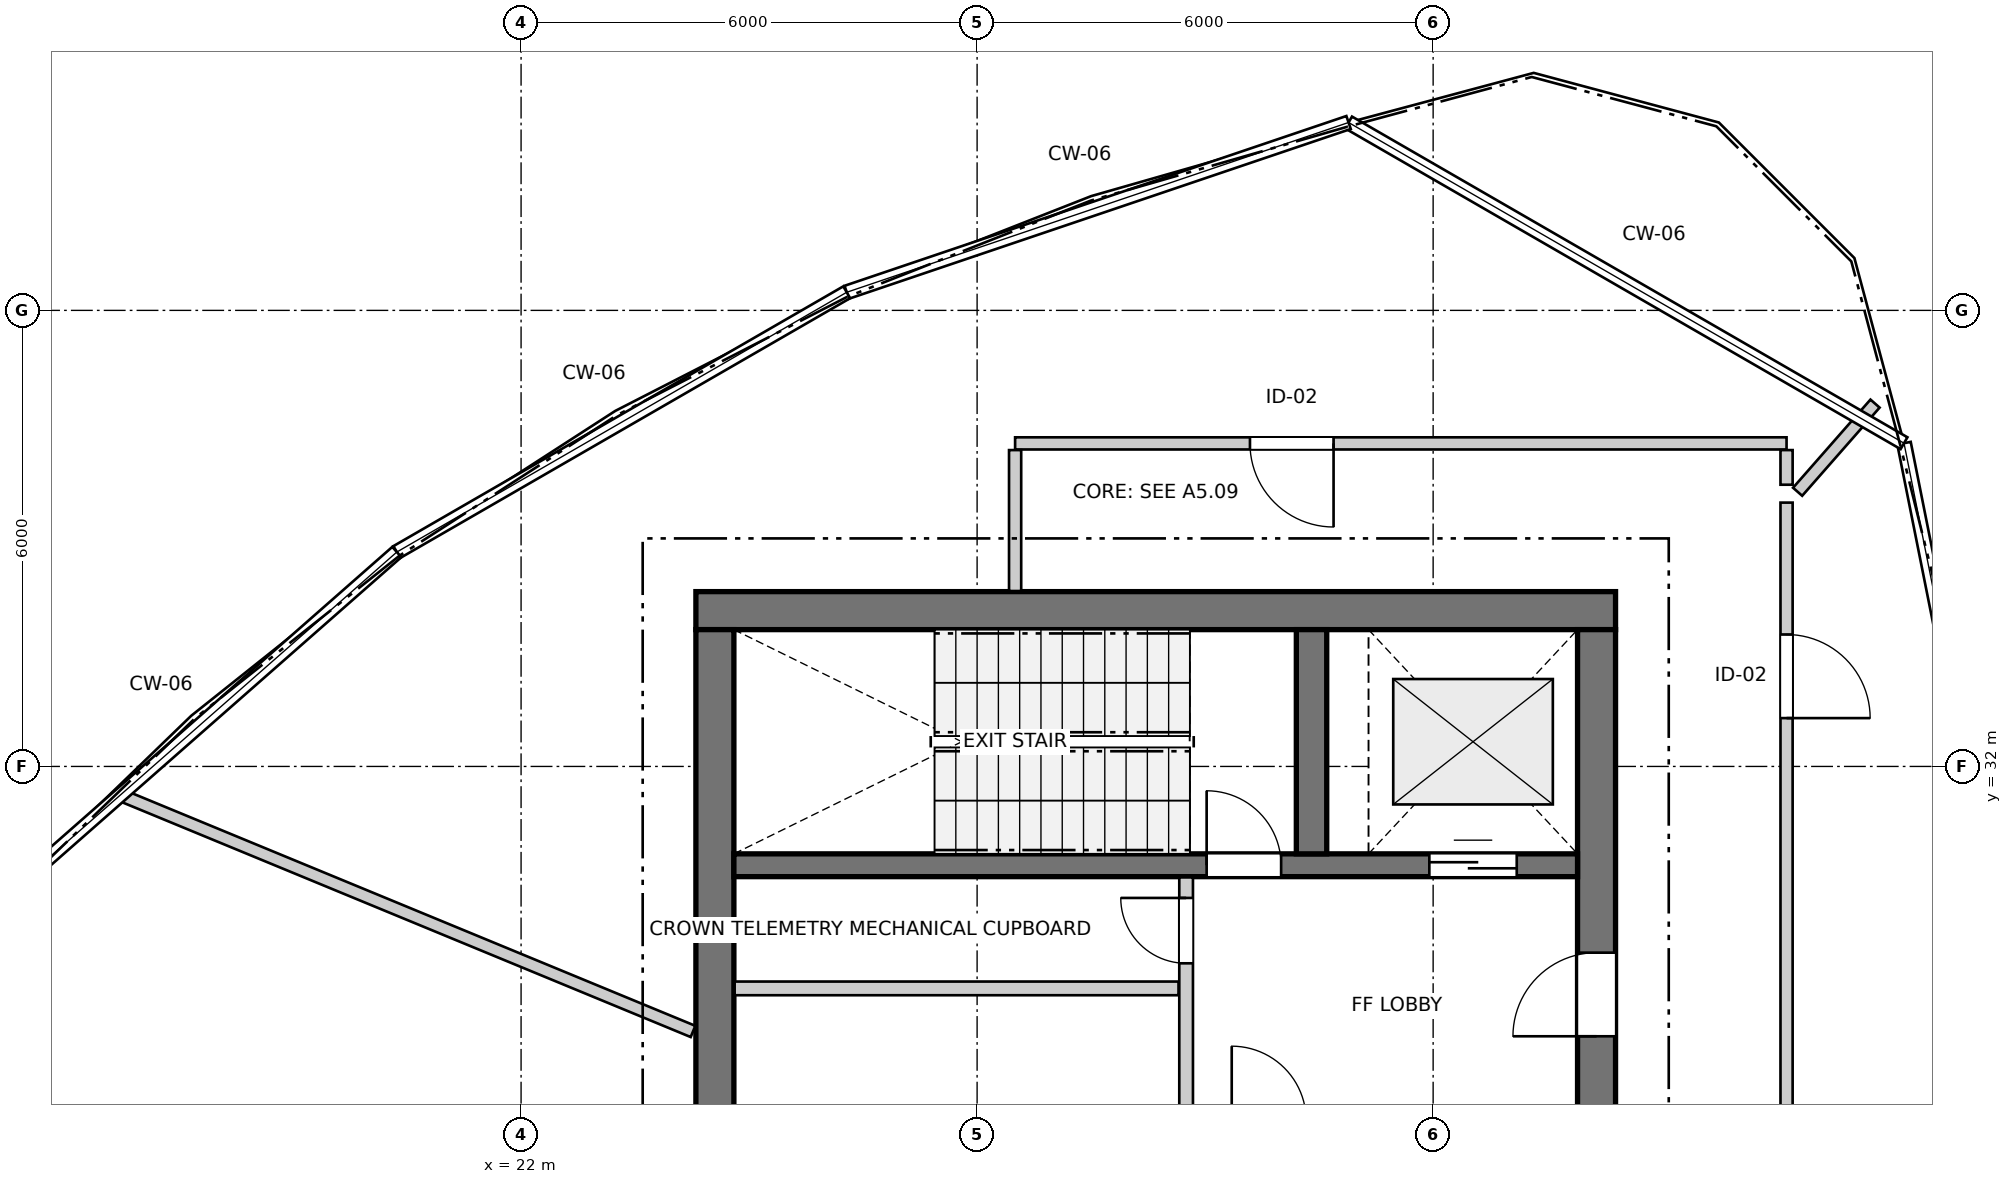
"""IFC4 building model, lengths in metres.
Left out: names, types, materials, properties, quantities, classifications, styles, units other than length and angle.
Written with IfcOpenShell. Run it as: python <this file> out.ifc"""

import sys

from ifc_helpers import new_model, si_unit, direction, frame, frame_2d, origin, place, context, subcontext, project, spatial, rectangle, extrude, source, transform, mapped, element, fill, save


model = new_model("IFC4")
c1 = context("Model", 3, precision=1e-05, world=origin(), true_north=direction((0.0, 1.0)))
c2 = subcontext(c1, "Body", "Model", "MODEL_VIEW")
j1 = project(units=[si_unit("LENGTHUNIT", "METRE"), si_unit("PLANEANGLEUNIT", "RADIAN")], contexts=[c1])
p1 = place(None, origin())
s1 = spatial("IfcSite", under=j1, at=p1, CompositionType="ELEMENT")
p2 = place(p1, origin())
s2 = spatial("IfcBuilding", under=s1, at=p2, CompositionType="ELEMENT")
p3 = place(p2, frame((0.0, 0.0, 261.8)))
s3 = spatial("IfcBuildingStorey", under=s2, at=p3, CompositionType="ELEMENT", Elevation=261.8)
p4 = place(p3, frame((36.4, 34.05, 0.0), z_axis=(0.0, 0.0, 1.0), x_axis=(-1.0, 0.0, 0.0)))
e1 = element("IfcWall", 1, at=p4, inside=s3, PredefinedType="SHEAR", context=c2, shape_type="SweptSolid", body=[
    extrude(rectangle(XDim=12.1, YDim=0.5, at=frame_2d((6.05, 0.0))), origin(), (0.0, 0.0, 1.0), 4.05),
])
p5 = place(p3, frame((24.55, 33.8, 0.0), z_axis=(0.0, 0.0, 1.0), x_axis=(0.0, -1.0, 0.0)))
e2 = element("IfcWall", 2, at=p5, inside=s3, PredefinedType="SHEAR", context=c2, shape_type="SweptSolid", body=[
    extrude(rectangle(XDim=15.6, YDim=0.5, at=frame_2d((7.8, 0.0))), origin(), (0.0, 0.0, 1.0), 4.05),
])
p6 = place(p3, frame((36.15, 18.2, 0.0), z_axis=(0.0, 0.0, 1.0), x_axis=(0.0, 1.0, 0.0)))
e3 = element("IfcWall", 3, at=p6, inside=s3, PredefinedType="SHEAR", context=c2, shape_type="SweptSolid", body=[
    extrude(rectangle(XDim=15.6, YDim=0.5, at=frame_2d((7.8, 0.0))), origin(), (0.0, 0.0, 1.0), 4.05),
])
p7 = place(p6, frame((4.25, 0.0, 0.0)))
e4 = element("IfcOpeningElement", 4, at=p7, cuts=e3, PredefinedType="OPENING", context=c2, shape_type="SweptSolid", body=[
    extrude(rectangle(XDim=1.1, YDim=2.15, at=frame_2d((0.55, 1.075))), frame((0.0, 0.26, 0.0), z_axis=(0.0, -1.0, 0.0), x_axis=(1.0, 0.0, 0.0)), (0.0, 0.0, 1.0), 0.52),
])
p8 = place(p6, frame((10.25, 0.0, 0.0)))
e5 = element("IfcOpeningElement", 5, at=p8, cuts=e3, PredefinedType="OPENING", context=c2, shape_type="SweptSolid", body=[
    extrude(rectangle(XDim=1.1, YDim=2.15, at=frame_2d((0.55, 1.075))), frame((0.0, 0.26, 0.0), z_axis=(0.0, -1.0, 0.0), x_axis=(1.0, 0.0, 0.0)), (0.0, 0.0, 1.0), 0.52),
])
p9 = place(p3, frame((24.8, 30.7, 0.0), z_axis=(0.0, 0.0, 1.0), x_axis=(1.0, 0.0, 0.0)))
e6 = element("IfcWall", 6, at=p9, inside=s3, PredefinedType="SHEAR", context=c2, shape_type="SweptSolid", body=[
    extrude(rectangle(XDim=11.1, YDim=0.3, at=frame_2d((5.55, 0.0))), origin(), (0.0, 0.0, 1.0), 4.05),
])
p10 = place(p9, frame((6.22, 0.0, 0.0)))
e7 = element("IfcOpeningElement", 7, at=p10, cuts=e6, PredefinedType="OPENING", context=c2, shape_type="SweptSolid", body=[
    extrude(rectangle(XDim=0.98, YDim=2.15, at=frame_2d((0.49, 1.075))), frame((0.0, 0.16, 0.0), z_axis=(0.0, -1.0, 0.0), x_axis=(1.0, 0.0, 0.0)), (0.0, 0.0, 1.0), 0.32),
])
p11 = place(p9, frame((9.15, 0.0, 0.0)))
e8 = element("IfcOpeningElement", 8, at=p11, cuts=e6, PredefinedType="OPENING", context=c2, shape_type="SweptSolid", body=[
    extrude(rectangle(XDim=1.15, YDim=2.15, at=frame_2d((0.575, 1.075))), frame((0.0, 0.16, 0.0), z_axis=(0.0, -1.0, 0.0), x_axis=(1.0, 0.0, 0.0)), (0.0, 0.0, 1.0), 0.32),
])
p12 = place(p3, frame((32.4, 30.85, 0.0), z_axis=(0.0, 0.0, 1.0), x_axis=(0.0, 1.0, 0.0)))
e9 = element("IfcWall", 9, at=p12, inside=s3, PredefinedType="SHEAR", context=c2, shape_type="SweptSolid", body=[
    extrude(rectangle(XDim=2.95, YDim=0.4, at=frame_2d((1.475, 0.0))), origin(), (0.0, 0.0, 1.0), 4.05),
])
p13 = place(p3, frame((30.75, 27.43, 0.0), z_axis=(0.0, 0.0, 1.0), x_axis=(0.0, 1.0, 0.0)))
e10 = element("IfcWall", 10, at=p13, inside=s3, PredefinedType="PARTITIONING", context=c2, shape_type="SweptSolid", body=[
    extrude(rectangle(XDim=3.11, YDim=0.18, at=frame_2d((1.555, 0.0))), origin(), (0.0, 0.0, 1.0), 4.05),
])
p14 = place(p13, frame((1.98, 0.0, 0.0)))
e11 = element("IfcOpeningElement", 11, at=p14, cuts=e10, PredefinedType="OPENING", context=c2, shape_type="SweptSolid", body=[
    extrude(rectangle(XDim=0.86, YDim=2.05, at=frame_2d((0.43, 1.025))), frame((0.0, 0.1, 0.0), z_axis=(0.0, -1.0, 0.0), x_axis=(1.0, 0.0, 0.0)), (0.0, 0.0, 1.0), 0.2),
])
p15 = place(p3, frame((24.81, 29.08, 0.0), z_axis=(0.0, 0.0, 1.0), x_axis=(1.0, 0.0, 0.0)))
e12 = element("IfcWall", 12, at=p15, inside=s3, PredefinedType="PARTITIONING", context=c2, shape_type="SweptSolid", body=[
    extrude(rectangle(XDim=5.84, YDim=0.18, at=frame_2d((2.92, 0.0))), origin(), (0.0, 0.0, 1.0), 4.05),
])
p16 = place(p3, frame((38.65, 35.471, 0.0), z_axis=(0.0, 0.0, 1.0), x_axis=(0.0, -1.0, 0.0)))
e13 = element("IfcWall", 13, at=p16, inside=s3, PredefinedType="PARTITIONING", context=c2, shape_type="SweptSolid", body=[
    extrude(rectangle(XDim=19.721, YDim=0.16, at=frame_2d((9.86, 0.0))), origin(), (0.0, 0.0, 1.0), 4.05),
])
p17 = place(p16, frame((1.735, 0.0, 0.0)))
e14 = element("IfcOpeningElement", 14, at=p17, cuts=e13, PredefinedType="OPENING", context=c2, shape_type="SweptSolid", body=[
    extrude(rectangle(XDim=1.1, YDim=2.15, at=frame_2d((0.55, 1.075))), frame((0.0, 0.09, 0.0), z_axis=(0.0, -1.0, 0.0), x_axis=(1.0, 0.0, 0.0)), (0.0, 0.0, 1.0), 0.18),
])
p18 = place(p3, frame((38.65, 36.25, 0.0), z_axis=(0.0, 0.0, 1.0), x_axis=(-1.0, 0.0, 0.0)))
e15 = element("IfcWall", 15, at=p18, inside=s3, PredefinedType="PARTITIONING", context=c2, shape_type="SweptSolid", body=[
    extrude(rectangle(XDim=10.15, YDim=0.16, at=frame_2d((5.075, 0.0))), origin(), (0.0, 0.0, 1.0), 4.05),
])
p19 = place(p18, frame((5.96, 0.0, 0.0)))
e16 = element("IfcOpeningElement", 16, at=p19, cuts=e15, PredefinedType="OPENING", context=c2, shape_type="SweptSolid", body=[
    extrude(rectangle(XDim=1.1, YDim=2.15, at=frame_2d((0.55, 1.075))), frame((0.0, 0.09, 0.0), z_axis=(0.0, -1.0, 0.0), x_axis=(1.0, 0.0, 0.0)), (0.0, 0.0, 1.0), 0.18),
])
p20 = place(p3, frame((16.755, 31.614, 0.0), z_axis=(0.0, 0.0, 1.0), x_axis=(0.924294163269, -0.381680887323, 0.0)))
e17 = element("IfcWall", 17, at=p20, inside=s3, PredefinedType="PARTITIONING", context=c2, shape_type="SweptSolid", body=[
    extrude(rectangle(XDim=8.122, YDim=0.16, at=frame_2d((4.061, 0.0))), origin(), (0.0, 0.0, 1.0), 4.05),
])
p21 = place(p3, frame((28.5, 34.308, 0.0), z_axis=(0.0, 0.0, 1.0), x_axis=(0.0, 1.0, 0.0)))
e18 = element("IfcWall", 18, at=p21, inside=s3, PredefinedType="PARTITIONING", context=c2, shape_type="SweptSolid", body=[
    extrude(rectangle(XDim=1.854, YDim=0.16, at=frame_2d((0.927, 0.0))), origin(), (0.0, 0.0, 1.0), 4.05),
])
p22 = place(p3, frame((38.795, 35.614, 0.0), z_axis=(0.0, 0.0, 1.0), x_axis=(0.65984690388, 0.751400068832, 0.0)))
e19 = element("IfcWall", 19, at=p22, inside=s3, PredefinedType="PARTITIONING", context=c2, shape_type="SweptSolid", body=[
    extrude(rectangle(XDim=1.544, YDim=0.16, at=frame_2d((0.772, 0.0))), origin(), (0.0, 0.0, 1.0), 4.05),
])
p23 = place(p3, frame((38.65, 35.706, 0.0), z_axis=(0.0, 0.0, 1.0), x_axis=(0.0, 1.0, 0.0)))
e20 = element("IfcWall", 20, at=p23, inside=s3, PredefinedType="PARTITIONING", context=c2, shape_type="SweptSolid", body=[
    extrude(rectangle(XDim=0.456, YDim=0.16, at=frame_2d((0.228, 0.0))), origin(), (0.0, 0.0, 1.0), 4.05),
])
m1 = source(origin(), c2, "Body", "SweptSolid", [
    extrude(rectangle(XDim=0.98, YDim=2.15, at=frame_2d((0.49, 1.075))), frame((0.0, 0.025, 0.0), z_axis=(0.0, -1.0, 0.0), x_axis=(1.0, 0.0, 0.0)), (0.0, 0.0, 1.0), 0.05),
])
p24 = place(p10, origin())
e21 = element("IfcDoor", 21, at=p24, inside=s3, OperationType="SINGLE_SWING_LEFT", PredefinedType="DOOR", context=c2, shape_type="MappedRepresentation", body=[
    mapped(m1, transform((0.0, 0.0, 0.0), x_axis=(1.0, 0.0, 0.0), y_axis=(0.0, 1.0, 0.0), z_axis=(0.0, 0.0, 1.0), scale=1.0)),
])
fill(e7, e21)
m2 = source(origin(), c2, "Body", "SweptSolid", [
    extrude(rectangle(XDim=1.15, YDim=2.15, at=frame_2d((0.575, 1.075))), frame((0.0, 0.025, 0.0), z_axis=(0.0, -1.0, 0.0), x_axis=(1.0, 0.0, 0.0)), (0.0, 0.0, 1.0), 0.05),
])
p25 = place(p11, origin())
e22 = element("IfcDoor", 22, at=p25, inside=s3, OperationType="DOUBLE_DOOR_SLIDING", PredefinedType="DOOR", context=c2, shape_type="MappedRepresentation", body=[
    mapped(m2, transform((0.0, 0.0, 0.0), x_axis=(1.0, 0.0, 0.0), y_axis=(0.0, 1.0, 0.0), z_axis=(0.0, 0.0, 1.0), scale=1.0)),
])
fill(e8, e22)
m3 = source(origin(), c2, "Body", "SweptSolid", [
    extrude(rectangle(XDim=1.1, YDim=2.15, at=frame_2d((0.55, 1.075))), frame((0.0, 0.025, 0.0), z_axis=(0.0, -1.0, 0.0), x_axis=(1.0, 0.0, 0.0)), (0.0, 0.0, 1.0), 0.05),
])
p26 = place(p8, origin())
e23 = element("IfcDoor", 23, at=p26, inside=s3, OperationType="SINGLE_SWING_LEFT", PredefinedType="DOOR", context=c2, shape_type="MappedRepresentation", body=[
    mapped(m3, transform((0.0, 0.0, 0.0), x_axis=(1.0, 0.0, 0.0), y_axis=(0.0, 1.0, 0.0), z_axis=(0.0, 0.0, 1.0), scale=1.0)),
])
fill(e5, e23)
m4 = source(origin(), c2, "Body", "SweptSolid", [
    extrude(rectangle(XDim=0.86, YDim=2.05, at=frame_2d((0.43, 1.025))), frame((0.0, 0.025, 0.0), z_axis=(0.0, -1.0, 0.0), x_axis=(1.0, 0.0, 0.0)), (0.0, 0.0, 1.0), 0.05),
])
p27 = place(p14, origin())
e24 = element("IfcDoor", 24, at=p27, inside=s3, OperationType="SINGLE_SWING_RIGHT", PredefinedType="DOOR", context=c2, shape_type="MappedRepresentation", body=[
    mapped(m4, transform((0.0, 0.0, 0.0), x_axis=(1.0, 0.0, 0.0), y_axis=(0.0, 1.0, 0.0), z_axis=(0.0, 0.0, 1.0), scale=1.0)),
])
fill(e11, e24)
p28 = place(p17, origin())
e25 = element("IfcDoor", 25, at=p28, inside=s3, OperationType="SINGLE_SWING_RIGHT", PredefinedType="DOOR", context=c2, shape_type="MappedRepresentation", body=[
    mapped(m3, transform((0.0, 0.0, 0.0), x_axis=(1.0, 0.0, 0.0), y_axis=(0.0, 1.0, 0.0), z_axis=(0.0, 0.0, 1.0), scale=1.0)),
])
fill(e14, e25)
p29 = place(p19, origin())
e26 = element("IfcDoor", 26, at=p29, inside=s3, OperationType="SINGLE_SWING_LEFT", PredefinedType="DOOR", context=c2, shape_type="MappedRepresentation", body=[
    mapped(m3, transform((0.0, 0.0, 0.0), x_axis=(1.0, 0.0, 0.0), y_axis=(0.0, 1.0, 0.0), z_axis=(0.0, 0.0, 1.0), scale=1.0)),
])
fill(e16, e26)
save(model, sys.argv[1])
